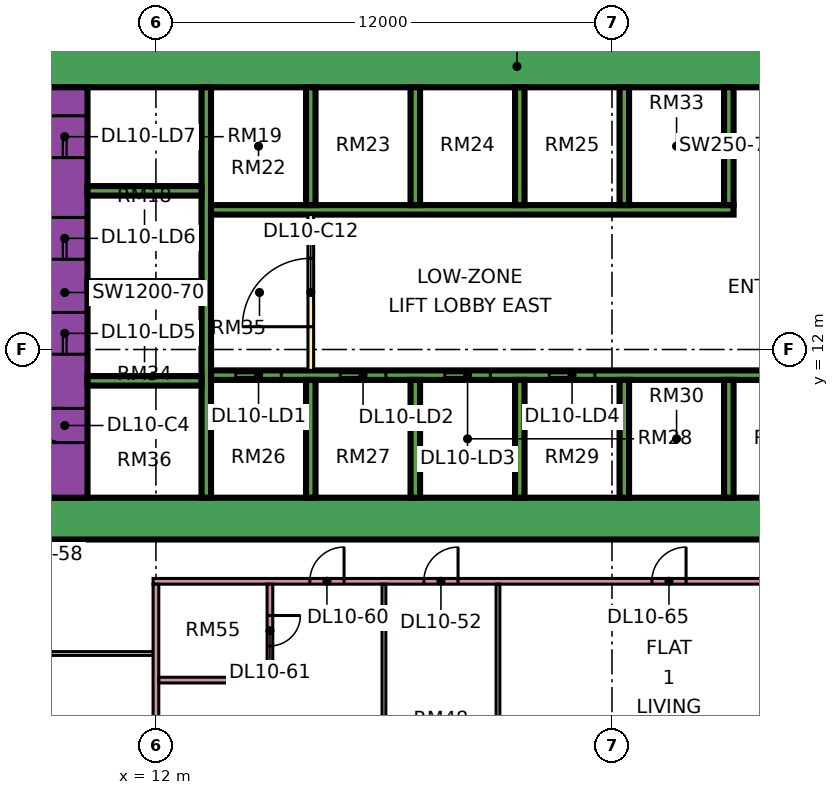
"""IFC4 building model, lengths in metres.
Left out: names, types, materials, properties, quantities, classifications, styles, units other than length and angle.
Written with IfcOpenShell. Run it as: python <this file> out.ifc"""

import sys

from ifc_helpers import new_model, si_unit, direction, frame, frame_2d, origin, place, context, subcontext, project, spatial, rectangle, extrude, element, fill, save


model = new_model("IFC4")
c1 = context("Model", 3, precision=1e-05, world=origin(), true_north=direction((0.0, 1.0)))
c2 = subcontext(c1, "Body", "Model", "MODEL_VIEW")
j1 = project(units=[si_unit("LENGTHUNIT", "METRE"), si_unit("PLANEANGLEUNIT", "RADIAN")], contexts=[c1])
p1 = place(None, origin())
s1 = spatial("IfcSite", under=j1, at=p1, CompositionType="ELEMENT")
p2 = place(p1, origin())
s2 = spatial("IfcBuilding", under=s1, at=p2, CompositionType="ELEMENT")
p3 = place(p2, frame((0.0, 0.0, 52.65)))
s3 = spatial("IfcBuildingStorey", under=s2, at=p3, CompositionType="ELEMENT", Elevation=52.65)
p4 = place(p3, frame((9.0, 7.55, 0.0), z_axis=(0.0, 0.0, 1.0), x_axis=(1.0, 0.0, 0.0)))
e1 = element("IfcWall", 1, at=p4, inside=s3, PredefinedType="SHEAR", context=c2, shape_type="SweptSolid", body=[
    extrude(rectangle(XDim=25.0, YDim=1.1, at=frame_2d((12.5, 0.0))), origin(), (0.0, 0.0, 1.0), 3.75),
])
p5 = place(p3, frame((9.0, 19.45, 0.0), z_axis=(0.0, 0.0, 1.0), x_axis=(1.0, 0.0, 0.0)))
e2 = element("IfcWall", 2, at=p5, inside=s3, PredefinedType="SHEAR", context=c2, shape_type="SweptSolid", body=[
    extrude(rectangle(XDim=25.0, YDim=1.1, at=frame_2d((12.5, 0.0))), origin(), (0.0, 0.0, 1.0), 3.75),
])
p6 = place(p5, frame((19.1, 0.0, 0.0)))
e3 = element("IfcOpeningElement", 3, at=p6, cuts=e2, PredefinedType="OPENING", context=c2, shape_type="SweptSolid", body=[
    extrude(rectangle(XDim=1.8, YDim=2.4, at=frame_2d((0.9, 1.2))), frame((0.0, 0.56, 0.0), z_axis=(0.0, -1.0, 0.0), x_axis=(1.0, 0.0, 0.0)), (0.0, 0.0, 1.0), 1.12),
])
p7 = place(p3, frame((9.6, 8.1, 0.0), z_axis=(0.0, 0.0, 1.0), x_axis=(0.0, 1.0, 0.0)))
e4 = element("IfcWall", 4, at=p7, inside=s3, PredefinedType="SHEAR", context=c2, shape_type="SweptSolid", body=[
    extrude(rectangle(XDim=10.8, YDim=1.2, at=frame_2d((5.4, 0.0))), origin(), (0.0, 0.0, 1.0), 3.75),
])
p8 = place(p7, frame((3.775, 0.0, 0.0)))
e5 = element("IfcOpeningElement", 5, at=p8, cuts=e4, PredefinedType="OPENING", context=c2, shape_type="SweptSolid", body=[
    extrude(rectangle(XDim=1.1, YDim=2.2, at=frame_2d((0.55, 1.1))), frame((0.0, 0.61, 0.0), z_axis=(0.0, -1.0, 0.0), x_axis=(1.0, 0.0, 0.0)), (0.0, 0.0, 1.0), 1.22),
])
p9 = place(p7, frame((6.275, 0.0, 0.0)))
e6 = element("IfcOpeningElement", 6, at=p9, cuts=e4, PredefinedType="OPENING", context=c2, shape_type="SweptSolid", body=[
    extrude(rectangle(XDim=1.1, YDim=2.2, at=frame_2d((0.55, 1.1))), frame((0.0, 0.61, 0.0), z_axis=(0.0, -1.0, 0.0), x_axis=(1.0, 0.0, 0.0)), (0.0, 0.0, 1.0), 1.22),
])
p10 = place(p7, frame((8.95, 0.0, 0.0)))
e7 = element("IfcOpeningElement", 7, at=p10, cuts=e4, PredefinedType="OPENING", context=c2, shape_type="SweptSolid", body=[
    extrude(rectangle(XDim=1.1, YDim=2.2, at=frame_2d((0.55, 1.1))), frame((0.0, 0.61, 0.0), z_axis=(0.0, -1.0, 0.0), x_axis=(1.0, 0.0, 0.0)), (0.0, 0.0, 1.0), 1.22),
])
p11 = place(p7, frame((1.45, 0.0, 0.0)))
e8 = element("IfcOpeningElement", 8, at=p11, cuts=e4, PredefinedType="OPENING", context=c2, shape_type="SweptSolid", body=[
    extrude(rectangle(XDim=0.9, YDim=2.1, at=frame_2d((0.45, 1.05))), frame((0.0, 0.61, 0.0), z_axis=(0.0, -1.0, 0.0), x_axis=(1.0, 0.0, 0.0)), (0.0, 0.0, 1.0), 1.22),
])
p12 = place(p3, frame((13.325, 8.1, 0.0), z_axis=(0.0, 0.0, 1.0), x_axis=(0.0, 1.0, 0.0)))
e9 = element("IfcWall", 9, at=p12, inside=s3, PredefinedType="SHEAR", context=c2, shape_type="SweptSolid", body=[
    extrude(rectangle(XDim=10.8, YDim=0.25, at=frame_2d((5.4, 0.0))), origin(), (0.0, 0.0, 1.0), 3.75),
])
p13 = place(p3, frame((13.45, 11.325, 0.0), z_axis=(0.0, 0.0, 1.0), x_axis=(1.0, 0.0, 0.0)))
e10 = element("IfcWall", 10, at=p13, inside=s3, PredefinedType="SHEAR", context=c2, shape_type="SweptSolid", body=[
    extrude(rectangle(XDim=19.45, YDim=0.25, at=frame_2d((9.725, 0.0))), origin(), (0.0, 0.0, 1.0), 3.75),
])
p14 = place(p13, frame((0.65, 0.0, 0.0)))
e11 = element("IfcOpeningElement", 11, at=p14, cuts=e10, PredefinedType="OPENING", context=c2, shape_type="SweptSolid", body=[
    extrude(rectangle(XDim=1.2, YDim=2.2, at=frame_2d((0.6, 1.1))), frame((0.0, 0.135, 0.0), z_axis=(0.0, -1.0, 0.0), x_axis=(1.0, 0.0, 0.0)), (0.0, 0.0, 1.0), 0.27),
])
p15 = place(p13, frame((3.4, 0.0, 0.0)))
e12 = element("IfcOpeningElement", 12, at=p15, cuts=e10, PredefinedType="OPENING", context=c2, shape_type="SweptSolid", body=[
    extrude(rectangle(XDim=1.2, YDim=2.2, at=frame_2d((0.6, 1.1))), frame((0.0, 0.135, 0.0), z_axis=(0.0, -1.0, 0.0), x_axis=(1.0, 0.0, 0.0)), (0.0, 0.0, 1.0), 0.27),
])
p16 = place(p13, frame((6.15, 0.0, 0.0)))
e13 = element("IfcOpeningElement", 13, at=p16, cuts=e10, PredefinedType="OPENING", context=c2, shape_type="SweptSolid", body=[
    extrude(rectangle(XDim=1.2, YDim=2.2, at=frame_2d((0.6, 1.1))), frame((0.0, 0.135, 0.0), z_axis=(0.0, -1.0, 0.0), x_axis=(1.0, 0.0, 0.0)), (0.0, 0.0, 1.0), 0.27),
])
p17 = place(p13, frame((8.9, 0.0, 0.0)))
e14 = element("IfcOpeningElement", 14, at=p17, cuts=e10, PredefinedType="OPENING", context=c2, shape_type="SweptSolid", body=[
    extrude(rectangle(XDim=1.2, YDim=2.2, at=frame_2d((0.6, 1.1))), frame((0.0, 0.135, 0.0), z_axis=(0.0, -1.0, 0.0), x_axis=(1.0, 0.0, 0.0)), (0.0, 0.0, 1.0), 0.27),
])
p18 = place(p3, frame((13.45, 15.675, 0.0), z_axis=(0.0, 0.0, 1.0), x_axis=(1.0, 0.0, 0.0)))
e15 = element("IfcWall", 15, at=p18, inside=s3, PredefinedType="SHEAR", context=c2, shape_type="SweptSolid", body=[
    extrude(rectangle(XDim=13.75, YDim=0.25, at=frame_2d((6.875, 0.0))), origin(), (0.0, 0.0, 1.0), 3.75),
])
for number, where, z_axis, x_axis in (
    (16, (10.2, 11.175, 0.0), (0.0, 0.0, 1.0), (1.0, 0.0, 0.0)),
    (17, (10.2, 13.675, 0.0), (0.0, 0.0, 1.0), (1.0, 0.0, 0.0)),
    (18, (10.2, 16.175, 0.0), (0.0, 0.0, 1.0), (1.0, 0.0, 0.0)),
):
    element("IfcWall", number, at=place(p3, frame(where, z_axis=z_axis, x_axis=x_axis)), inside=s3, PredefinedType="SHEAR", context=c2, shape_type="SweptSolid", body=[
        extrude(rectangle(XDim=3.0, YDim=0.25, at=frame_2d((1.5, 0.0))), origin(), (0.0, 0.0, 1.0), 3.75),
    ])
for number, where, z_axis, x_axis in (
    (19, (16.075, 8.1, 0.0), (0.0, 0.0, 1.0), (0.0, 1.0, 0.0)),
    (20, (18.825, 8.1, 0.0), (0.0, 0.0, 1.0), (0.0, 1.0, 0.0)),
    (21, (21.575, 8.1, 0.0), (0.0, 0.0, 1.0), (0.0, 1.0, 0.0)),
    (22, (24.325, 8.1, 0.0), (0.0, 0.0, 1.0), (0.0, 1.0, 0.0)),
    (23, (27.075, 8.1, 0.0), (0.0, 0.0, 1.0), (0.0, 1.0, 0.0)),
    (24, (16.075, 15.8, 0.0), (0.0, 0.0, 1.0), (0.0, 1.0, 0.0)),
    (25, (18.825, 15.8, 0.0), (0.0, 0.0, 1.0), (0.0, 1.0, 0.0)),
    (26, (21.575, 15.8, 0.0), (0.0, 0.0, 1.0), (0.0, 1.0, 0.0)),
    (27, (24.325, 15.8, 0.0), (0.0, 0.0, 1.0), (0.0, 1.0, 0.0)),
    (28, (27.075, 15.8, 0.0), (0.0, 0.0, 1.0), (0.0, 1.0, 0.0)),
):
    element("IfcWall", number, at=place(p3, frame(where, z_axis=z_axis, x_axis=x_axis)), inside=s3, PredefinedType="SHEAR", context=c2, shape_type="SweptSolid", body=[
        extrude(rectangle(XDim=3.1, YDim=0.25, at=frame_2d((1.55, 0.0))), origin(), (0.0, 0.0, 1.0), 3.75),
    ])
p19 = place(p3, frame((-1.447, 12.553, 0.0), z_axis=(0.0, 0.0, 1.0), x_axis=(0.707106781187, -0.707106781187, 0.0)))
e29 = element("IfcWall", 29, at=p19, inside=s3, PredefinedType="SOLIDWALL", context=c2, shape_type="SweptSolid", body=[
    extrude(rectangle(XDim=19.799, YDim=0.15, at=frame_2d((9.899, 0.0))), origin(), (0.0, 0.0, 1.0), 3.35),
])
p20 = place(p19, frame((2.212, 0.0, 0.45)))
e30 = element("IfcOpeningElement", 30, at=p20, cuts=e29, PredefinedType="OPENING", context=c2, shape_type="SweptSolid", body=[
    extrude(rectangle(XDim=3.0, YDim=2.4, at=frame_2d((1.5, 1.2))), frame((0.0, 0.085, 0.0), z_axis=(0.0, -1.0, 0.0), x_axis=(1.0, 0.0, 0.0)), (0.0, 0.0, 1.0), 0.17),
])
p21 = place(p19, frame((10.216, 0.0, 0.45)))
e31 = element("IfcOpeningElement", 31, at=p21, cuts=e29, PredefinedType="OPENING", context=c2, shape_type="SweptSolid", body=[
    extrude(rectangle(XDim=3.0, YDim=2.4, at=frame_2d((1.5, 1.2))), frame((0.0, 0.085, 0.0), z_axis=(0.0, -1.0, 0.0), x_axis=(1.0, 0.0, 0.0)), (0.0, 0.0, 1.0), 0.17),
])
p22 = place(p3, frame((16.075, 11.45, 0.0), z_axis=(0.0, 0.0, 1.0), x_axis=(0.0, 1.0, 0.0)))
e32 = element("IfcWall", 32, at=p22, inside=s3, PredefinedType="PARTITIONING", context=c2, shape_type="SweptSolid", body=[
    extrude(rectangle(XDim=4.1, YDim=0.15, at=frame_2d((2.05, 0.0))), origin(), (0.0, 0.0, 1.0), 3.35),
])
p23 = place(p22, frame((1.15, 0.0, 0.0)))
e33 = element("IfcOpeningElement", 33, at=p23, cuts=e32, PredefinedType="OPENING", context=c2, shape_type="SweptSolid", body=[
    extrude(rectangle(XDim=1.8, YDim=2.4, at=frame_2d((0.9, 1.2))), frame((0.0, 0.085, 0.0), z_axis=(0.0, -1.0, 0.0), x_axis=(1.0, 0.0, 0.0)), (0.0, 0.0, 1.0), 0.17),
])
p24 = place(p3, frame((9.05, 4.0, 0.0), z_axis=(0.0, 0.0, 1.0), x_axis=(1.0, 0.0, 0.0)))
e34 = element("IfcWall", 34, at=p24, inside=s3, PredefinedType="PARTITIONING", context=c2, shape_type="SweptSolid", body=[
    extrude(rectangle(XDim=2.875, YDim=0.1, at=frame_2d((1.438, 0.0))), origin(), (0.0, 0.0, 1.0), 3.35),
])
p25 = place(p3, frame((11.925, 5.9, 0.0), z_axis=(0.0, 0.0, 1.0), x_axis=(1.0, 0.0, 0.0)))
e35 = element("IfcWall", 35, at=p25, inside=s3, PredefinedType="PARTITIONING", context=c2, shape_type="SweptSolid", body=[
    extrude(rectangle(XDim=21.125, YDim=0.15, at=frame_2d((10.562, 0.0))), origin(), (0.0, 0.0, 1.0), 3.35),
])
p26 = place(p25, frame((7.125, 0.0, 0.0)))
e36 = element("IfcOpeningElement", 36, at=p26, cuts=e35, PredefinedType="OPENING", context=c2, shape_type="SweptSolid", body=[
    extrude(rectangle(XDim=0.9, YDim=2.1, at=frame_2d((0.45, 1.05))), frame((0.0, 0.085, 0.0), z_axis=(0.0, -1.0, 0.0), x_axis=(1.0, 0.0, 0.0)), (0.0, 0.0, 1.0), 0.17),
])
p27 = place(p25, frame((4.125, 0.0, 0.0)))
e37 = element("IfcOpeningElement", 37, at=p27, cuts=e35, PredefinedType="OPENING", context=c2, shape_type="SweptSolid", body=[
    extrude(rectangle(XDim=0.9, YDim=2.1, at=frame_2d((0.45, 1.05))), frame((0.0, 0.085, 0.0), z_axis=(0.0, -1.0, 0.0), x_axis=(1.0, 0.0, 0.0)), (0.0, 0.0, 1.0), 0.17),
])
p28 = place(p25, frame((13.125, 0.0, 0.0)))
e38 = element("IfcOpeningElement", 38, at=p28, cuts=e35, PredefinedType="OPENING", context=c2, shape_type="SweptSolid", body=[
    extrude(rectangle(XDim=0.9, YDim=2.1, at=frame_2d((0.45, 1.05))), frame((0.0, 0.085, 0.0), z_axis=(0.0, -1.0, 0.0), x_axis=(1.0, 0.0, 0.0)), (0.0, 0.0, 1.0), 0.17),
])
p29 = place(p3, frame((12.0, -0.788, 0.0), z_axis=(0.0, 0.0, 1.0), x_axis=(0.0, 1.0, 0.0)))
e39 = element("IfcWall", 39, at=p29, inside=s3, PredefinedType="PARTITIONING", context=c2, shape_type="SweptSolid", body=[
    extrude(rectangle(XDim=6.613, YDim=0.15, at=frame_2d((3.306, 0.0))), origin(), (0.0, 0.0, 1.0), 3.35),
])
p30 = place(p3, frame((12.075, 3.3, 0.0), z_axis=(0.0, 0.0, 1.0), x_axis=(1.0, 0.0, 0.0)))
e40 = element("IfcWall", 40, at=p30, inside=s3, PredefinedType="PARTITIONING", context=c2, shape_type="SweptSolid", body=[
    extrude(rectangle(XDim=3.0, YDim=0.15, at=frame_2d((1.5, 0.0))), origin(), (0.0, 0.0, 1.0), 3.35),
])
p31 = place(p3, frame((15.0, 3.375, 0.0), z_axis=(0.0, 0.0, 1.0), x_axis=(0.0, 1.0, 0.0)))
e41 = element("IfcWall", 41, at=p31, inside=s3, PredefinedType="PARTITIONING", context=c2, shape_type="SweptSolid", body=[
    extrude(rectangle(XDim=2.45, YDim=0.15, at=frame_2d((1.225, 0.0))), origin(), (0.0, 0.0, 1.0), 3.35),
])
p32 = place(p31, frame((0.825, 0.0, 0.0)))
e42 = element("IfcOpeningElement", 42, at=p32, cuts=e41, PredefinedType="OPENING", context=c2, shape_type="SweptSolid", body=[
    extrude(rectangle(XDim=0.8, YDim=2.1, at=frame_2d((0.4, 1.05))), frame((0.0, 0.085, 0.0), z_axis=(0.0, -1.0, 0.0), x_axis=(1.0, 0.0, 0.0)), (0.0, 0.0, 1.0), 0.17),
])
p33 = place(p3, frame((18.0, -1.351, 0.0), z_axis=(0.0, 0.0, 1.0), x_axis=(0.0, 1.0, 0.0)))
e43 = element("IfcWall", 43, at=p33, inside=s3, PredefinedType="PARTITIONING", context=c2, shape_type="SweptSolid", body=[
    extrude(rectangle(XDim=7.176, YDim=0.1, at=frame_2d((3.588, 0.0))), origin(), (0.0, 0.0, 1.0), 3.35),
])
p34 = place(p3, frame((21.0, -1.35, 0.0), z_axis=(0.0, 0.0, 1.0), x_axis=(0.0, 1.0, 0.0)))
e44 = element("IfcWall", 44, at=p34, inside=s3, PredefinedType="PARTITIONING", context=c2, shape_type="SweptSolid", body=[
    extrude(rectangle(XDim=7.175, YDim=0.1, at=frame_2d((3.587, 0.0))), origin(), (0.0, 0.0, 1.0), 3.35),
])
p35 = place(p14, origin())
e45 = element("IfcDoor", 45, at=p35, inside=s3, OperationType="DOUBLE_DOOR_SLIDING", PredefinedType="DOOR", context=c2, shape_type="SweptSolid", body=[
    extrude(rectangle(XDim=1.2, YDim=2.2, at=frame_2d((0.6, 1.1))), frame((0.0, 0.025, 0.0), z_axis=(0.0, -1.0, 0.0), x_axis=(1.0, 0.0, 0.0)), (0.0, 0.0, 1.0), 0.05),
])
fill(e11, e45)
p36 = place(p15, origin())
e46 = element("IfcDoor", 46, at=p36, inside=s3, OperationType="DOUBLE_DOOR_SLIDING", PredefinedType="DOOR", context=c2, shape_type="SweptSolid", body=[
    extrude(rectangle(XDim=1.2, YDim=2.2, at=frame_2d((0.6, 1.1))), frame((0.0, 0.025, 0.0), z_axis=(0.0, -1.0, 0.0), x_axis=(1.0, 0.0, 0.0)), (0.0, 0.0, 1.0), 0.05),
])
fill(e12, e46)
p37 = place(p16, origin())
e47 = element("IfcDoor", 47, at=p37, inside=s3, OperationType="DOUBLE_DOOR_SLIDING", PredefinedType="DOOR", context=c2, shape_type="SweptSolid", body=[
    extrude(rectangle(XDim=1.2, YDim=2.2, at=frame_2d((0.6, 1.1))), frame((0.0, 0.025, 0.0), z_axis=(0.0, -1.0, 0.0), x_axis=(1.0, 0.0, 0.0)), (0.0, 0.0, 1.0), 0.05),
])
fill(e13, e47)
p38 = place(p17, origin())
e48 = element("IfcDoor", 48, at=p38, inside=s3, OperationType="DOUBLE_DOOR_SLIDING", PredefinedType="DOOR", context=c2, shape_type="SweptSolid", body=[
    extrude(rectangle(XDim=1.2, YDim=2.2, at=frame_2d((0.6, 1.1))), frame((0.0, 0.025, 0.0), z_axis=(0.0, -1.0, 0.0), x_axis=(1.0, 0.0, 0.0)), (0.0, 0.0, 1.0), 0.05),
])
fill(e14, e48)
p39 = place(p8, origin())
e49 = element("IfcDoor", 49, at=p39, inside=s3, OperationType="DOUBLE_DOOR_SLIDING", PredefinedType="DOOR", context=c2, shape_type="SweptSolid", body=[
    extrude(rectangle(XDim=1.1, YDim=2.2, at=frame_2d((0.55, 1.1))), frame((0.0, 0.025, 0.0), z_axis=(0.0, -1.0, 0.0), x_axis=(1.0, 0.0, 0.0)), (0.0, 0.0, 1.0), 0.05),
])
fill(e5, e49)
p40 = place(p9, origin())
e50 = element("IfcDoor", 50, at=p40, inside=s3, OperationType="DOUBLE_DOOR_SLIDING", PredefinedType="DOOR", context=c2, shape_type="SweptSolid", body=[
    extrude(rectangle(XDim=1.1, YDim=2.2, at=frame_2d((0.55, 1.1))), frame((0.0, 0.025, 0.0), z_axis=(0.0, -1.0, 0.0), x_axis=(1.0, 0.0, 0.0)), (0.0, 0.0, 1.0), 0.05),
])
fill(e6, e50)
p41 = place(p10, origin())
e51 = element("IfcDoor", 51, at=p41, inside=s3, OperationType="DOUBLE_DOOR_SLIDING", PredefinedType="DOOR", context=c2, shape_type="SweptSolid", body=[
    extrude(rectangle(XDim=1.1, YDim=2.2, at=frame_2d((0.55, 1.1))), frame((0.0, 0.025, 0.0), z_axis=(0.0, -1.0, 0.0), x_axis=(1.0, 0.0, 0.0)), (0.0, 0.0, 1.0), 0.05),
])
fill(e7, e51)
p42 = place(p11, frame((0.9, 0.0, 0.0), z_axis=(0.0, 0.0, 1.0), x_axis=(-1.0, 0.0, 0.0)))
e52 = element("IfcDoor", 52, at=p42, inside=s3, OperationType="SINGLE_SWING_RIGHT", PredefinedType="DOOR", context=c2, shape_type="SweptSolid", body=[
    extrude(rectangle(XDim=0.9, YDim=2.1, at=frame_2d((0.45, 1.05))), frame((0.0, 0.025, 0.0), z_axis=(0.0, -1.0, 0.0), x_axis=(1.0, 0.0, 0.0)), (0.0, 0.0, 1.0), 0.05),
])
fill(e8, e52)
p43 = place(p23, origin())
e53 = element("IfcDoor", 53, at=p43, inside=s3, OperationType="DOUBLE_DOOR_SINGLE_SWING", PredefinedType="DOOR", context=c2, shape_type="SweptSolid", body=[
    extrude(rectangle(XDim=1.8, YDim=2.4, at=frame_2d((0.9, 1.2))), frame((0.0, 0.025, 0.0), z_axis=(0.0, -1.0, 0.0), x_axis=(1.0, 0.0, 0.0)), (0.0, 0.0, 1.0), 0.05),
])
fill(e33, e53)
p44 = place(p26, frame((0.9, 0.0, 0.0), z_axis=(0.0, 0.0, 1.0), x_axis=(-1.0, 0.0, 0.0)))
e54 = element("IfcDoor", 54, at=p44, inside=s3, OperationType="SINGLE_SWING_RIGHT", PredefinedType="DOOR", context=c2, shape_type="SweptSolid", body=[
    extrude(rectangle(XDim=0.9, YDim=2.1, at=frame_2d((0.45, 1.05))), frame((0.0, 0.025, 0.0), z_axis=(0.0, -1.0, 0.0), x_axis=(1.0, 0.0, 0.0)), (0.0, 0.0, 1.0), 0.05),
])
fill(e36, e54)
p45 = place(p27, frame((0.9, 0.0, 0.0), z_axis=(0.0, 0.0, 1.0), x_axis=(-1.0, 0.0, 0.0)))
e55 = element("IfcDoor", 55, at=p45, inside=s3, OperationType="SINGLE_SWING_RIGHT", PredefinedType="DOOR", context=c2, shape_type="SweptSolid", body=[
    extrude(rectangle(XDim=0.9, YDim=2.1, at=frame_2d((0.45, 1.05))), frame((0.0, 0.025, 0.0), z_axis=(0.0, -1.0, 0.0), x_axis=(1.0, 0.0, 0.0)), (0.0, 0.0, 1.0), 0.05),
])
fill(e37, e55)
p46 = place(p32, origin())
e56 = element("IfcDoor", 56, at=p46, inside=s3, OperationType="SINGLE_SWING_RIGHT", PredefinedType="DOOR", context=c2, shape_type="SweptSolid", body=[
    extrude(rectangle(XDim=0.8, YDim=2.1, at=frame_2d((0.4, 1.05))), frame((0.0, 0.025, 0.0), z_axis=(0.0, -1.0, 0.0), x_axis=(1.0, 0.0, 0.0)), (0.0, 0.0, 1.0), 0.05),
])
fill(e42, e56)
p47 = place(p28, frame((0.9, 0.0, 0.0), z_axis=(0.0, 0.0, 1.0), x_axis=(-1.0, 0.0, 0.0)))
e57 = element("IfcDoor", 57, at=p47, inside=s3, OperationType="SINGLE_SWING_RIGHT", PredefinedType="DOOR", context=c2, shape_type="SweptSolid", body=[
    extrude(rectangle(XDim=0.9, YDim=2.1, at=frame_2d((0.45, 1.05))), frame((0.0, 0.025, 0.0), z_axis=(0.0, -1.0, 0.0), x_axis=(1.0, 0.0, 0.0)), (0.0, 0.0, 1.0), 0.05),
])
fill(e38, e57)
save(model, sys.argv[1])
